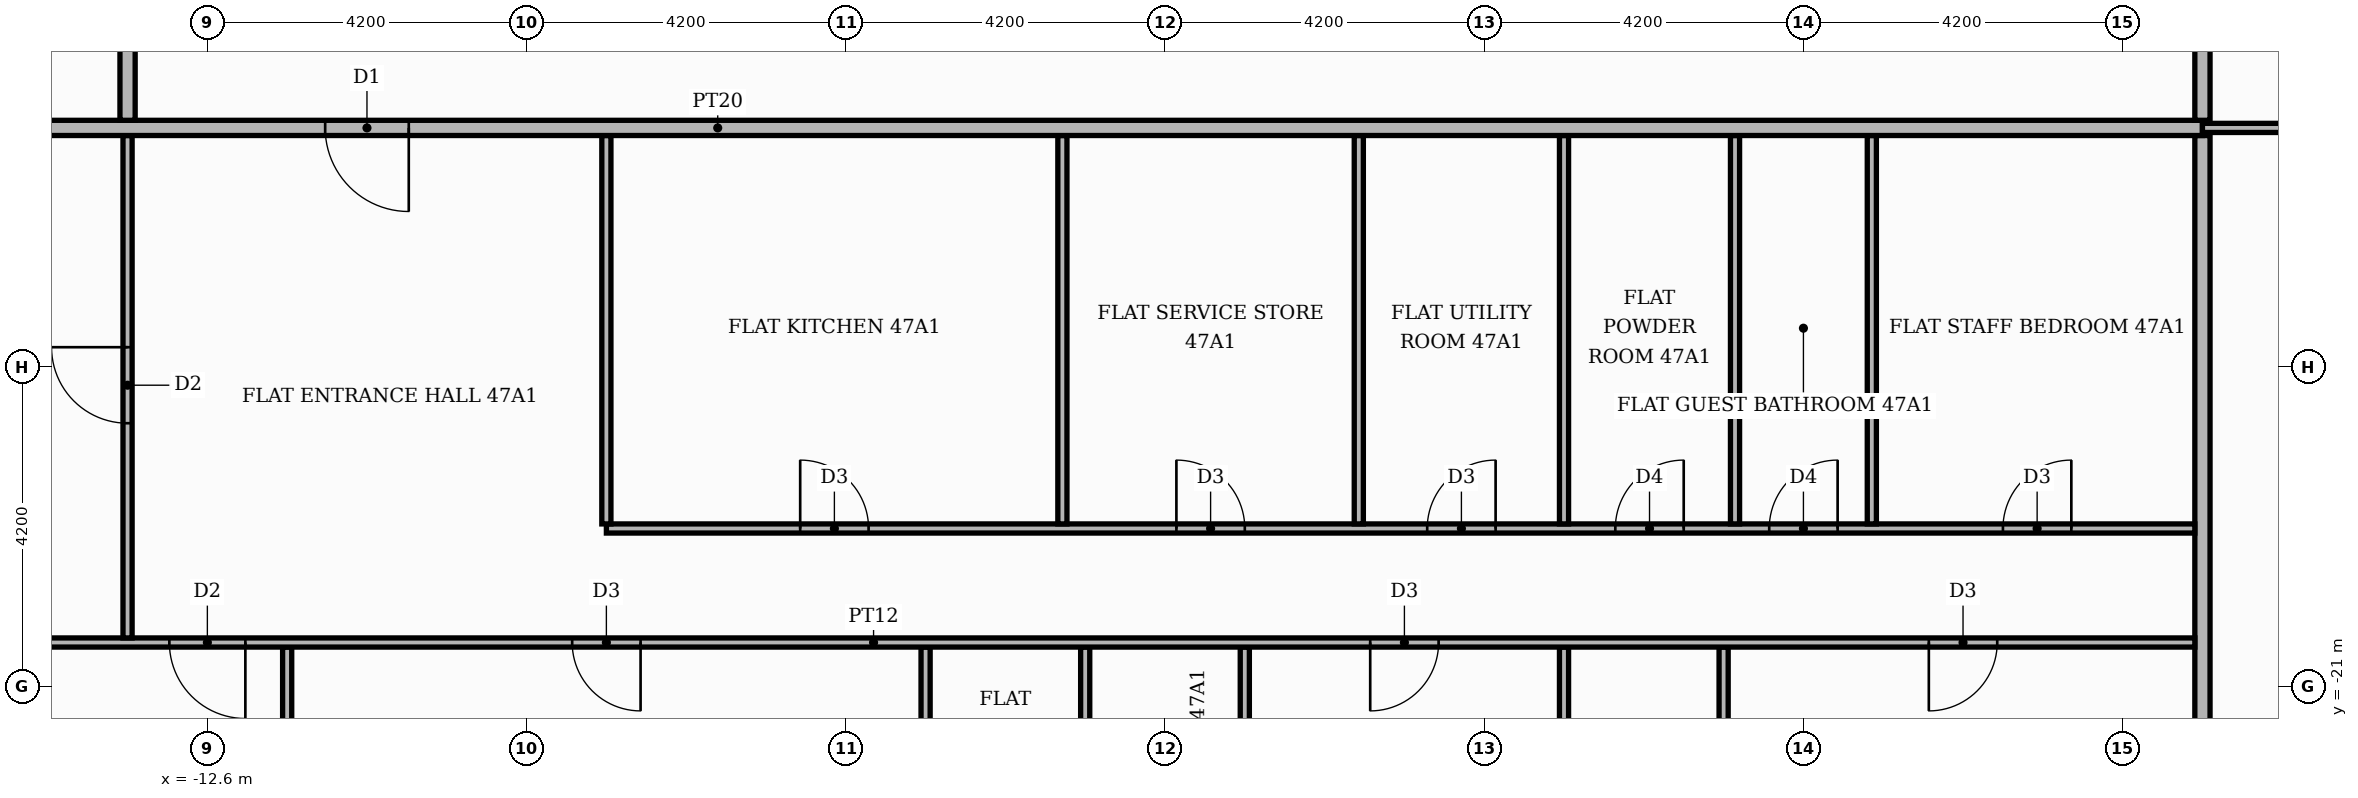
"""IFC4 building model, lengths in metres.
Left out: names, types, materials, properties, quantities, classifications, styles, units other than length and angle.
Written with IfcOpenShell. Run it as: python <this file> out.ifc"""

import sys

from ifc_helpers import new_model, si_unit, direction, frame, frame_2d, origin, place, context, subcontext, project, spatial, rectangle, extrude, element, fill, save


model = new_model("IFC4")
c1 = context("Model", 3, precision=1e-05, world=origin(), true_north=direction((0.0, 1.0)))
c2 = subcontext(c1, "Body", "Model", "MODEL_VIEW")
j1 = project(units=[si_unit("LENGTHUNIT", "METRE"), si_unit("PLANEANGLEUNIT", "RADIAN")], contexts=[c1])
p1 = place(None, origin())
s1 = spatial("IfcSite", under=j1, at=p1, CompositionType="ELEMENT")
p2 = place(p1, origin())
s2 = spatial("IfcBuilding", under=s1, at=p2, CompositionType="ELEMENT")
p3 = place(p2, frame((0.0, 0.0, 200.1)))
s3 = spatial("IfcBuildingStorey", under=s2, at=p3, CompositionType="ELEMENT", Elevation=200.1)
p4 = place(p3, frame((-11.55, -25.42, 0.0), z_axis=(0.0, 0.0, 1.0), x_axis=(0.0, 1.0, 0.0)))
e1 = element("IfcWall", 1, at=p4, inside=s3, PredefinedType="PARTITIONING", context=c2, shape_type="SweptSolid", body=[
    extrude(rectangle(XDim=4.94, YDim=0.12, at=frame_2d((2.47, 0.0))), origin(), (0.0, 0.0, 1.0), 3.48),
])
p5 = place(p3, frame((-3.15, -25.42, 0.0), z_axis=(0.0, 0.0, 1.0), x_axis=(0.0, 1.0, 0.0)))
e2 = element("IfcWall", 2, at=p5, inside=s3, PredefinedType="PARTITIONING", context=c2, shape_type="SweptSolid", body=[
    extrude(rectangle(XDim=4.94, YDim=0.12, at=frame_2d((2.47, 0.0))), origin(), (0.0, 0.0, 1.0), 3.48),
])
p6 = place(p5, frame((1.9, 0.0, 0.0)))
e3 = element("IfcOpeningElement", 3, at=p6, cuts=e2, PredefinedType="OPENING", context=c2, shape_type="SweptSolid", body=[
    extrude(rectangle(XDim=0.9, YDim=2.1, at=frame_2d((0.45, 1.05))), frame((0.0, 0.07, 0.0), z_axis=(0.0, -1.0, 0.0), x_axis=(1.0, 0.0, 0.0)), (0.0, 0.0, 1.0), 0.14),
])
p7 = place(p3, frame((-1.05, -25.42, 0.0), z_axis=(0.0, 0.0, 1.0), x_axis=(0.0, 1.0, 0.0)))
e4 = element("IfcWall", 4, at=p7, inside=s3, PredefinedType="PARTITIONING", context=c2, shape_type="SweptSolid", body=[
    extrude(rectangle(XDim=4.94, YDim=0.12, at=frame_2d((2.47, 0.0))), origin(), (0.0, 0.0, 1.0), 3.48),
])
p8 = place(p7, frame((1.9, 0.0, 0.0)))
e5 = element("IfcOpeningElement", 5, at=p8, cuts=e4, PredefinedType="OPENING", context=c2, shape_type="SweptSolid", body=[
    extrude(rectangle(XDim=0.9, YDim=2.1, at=frame_2d((0.45, 1.05))), frame((0.0, 0.07, 0.0), z_axis=(0.0, -1.0, 0.0), x_axis=(1.0, 0.0, 0.0)), (0.0, 0.0, 1.0), 0.14),
])
p9 = place(p3, frame((1.05, -25.42, 0.0), z_axis=(0.0, 0.0, 1.0), x_axis=(0.0, 1.0, 0.0)))
e6 = element("IfcWall", 6, at=p9, inside=s3, PredefinedType="PARTITIONING", context=c2, shape_type="SweptSolid", body=[
    extrude(rectangle(XDim=4.94, YDim=0.12, at=frame_2d((2.47, 0.0))), origin(), (0.0, 0.0, 1.0), 3.48),
])
p10 = place(p3, frame((5.25, -25.42, 0.0), z_axis=(0.0, 0.0, 1.0), x_axis=(0.0, 1.0, 0.0)))
e7 = element("IfcWall", 7, at=p10, inside=s3, PredefinedType="PARTITIONING", context=c2, shape_type="SweptSolid", body=[
    extrude(rectangle(XDim=4.94, YDim=0.12, at=frame_2d((2.47, 0.0))), origin(), (0.0, 0.0, 1.0), 3.48),
])
p11 = place(p10, frame((1.9, 0.0, 0.0)))
e8 = element("IfcOpeningElement", 8, at=p11, cuts=e7, PredefinedType="OPENING", context=c2, shape_type="SweptSolid", body=[
    extrude(rectangle(XDim=0.9, YDim=2.1, at=frame_2d((0.45, 1.05))), frame((0.0, 0.07, 0.0), z_axis=(0.0, -1.0, 0.0), x_axis=(1.0, 0.0, 0.0)), (0.0, 0.0, 1.0), 0.14),
])
p12 = place(p3, frame((7.35, -25.42, 0.0), z_axis=(0.0, 0.0, 1.0), x_axis=(0.0, 1.0, 0.0)))
e9 = element("IfcWall", 9, at=p12, inside=s3, PredefinedType="PARTITIONING", context=c2, shape_type="SweptSolid", body=[
    extrude(rectangle(XDim=4.94, YDim=0.12, at=frame_2d((2.47, 0.0))), origin(), (0.0, 0.0, 1.0), 3.48),
])
p13 = place(p3, frame((13.65, -25.42, 0.0), z_axis=(0.0, 0.0, 1.0), x_axis=(0.0, 1.0, 0.0)))
e10 = element("IfcWall", 10, at=p13, inside=s3, PredefinedType="PARTITIONING", context=c2, shape_type="SweptSolid", body=[
    extrude(rectangle(XDim=11.67, YDim=0.2, at=frame_2d((5.835, 0.0))), origin(), (0.0, 0.0, 1.0), 3.48),
])
p14 = place(p3, frame((-21.219, -20.42, 0.0), z_axis=(0.0, 0.0, 1.0), x_axis=(1.0, 0.0, 0.0)))
e11 = element("IfcWall", 11, at=p14, inside=s3, PredefinedType="PARTITIONING", context=c2, shape_type="SweptSolid", body=[
    extrude(rectangle(XDim=34.769, YDim=0.12, at=frame_2d((17.385, 0.0))), origin(), (0.0, 0.0, 1.0), 3.48),
])
p15 = place(p14, frame((8.119, 0.0, 0.0)))
e12 = element("IfcOpeningElement", 12, at=p15, cuts=e11, PredefinedType="OPENING", context=c2, shape_type="SweptSolid", body=[
    extrude(rectangle(XDim=1.0, YDim=2.1, at=frame_2d((0.5, 1.05))), frame((0.0, 0.07, 0.0), z_axis=(0.0, -1.0, 0.0), x_axis=(1.0, 0.0, 0.0)), (0.0, 0.0, 1.0), 0.14),
])
p16 = place(p14, frame((13.419, 0.0, 0.0)))
e13 = element("IfcOpeningElement", 13, at=p16, cuts=e11, PredefinedType="OPENING", context=c2, shape_type="SweptSolid", body=[
    extrude(rectangle(XDim=0.9, YDim=2.1, at=frame_2d((0.45, 1.05))), frame((0.0, 0.07, 0.0), z_axis=(0.0, -1.0, 0.0), x_axis=(1.0, 0.0, 0.0)), (0.0, 0.0, 1.0), 0.14),
])
p17 = place(p14, frame((23.919, 0.0, 0.0)))
e14 = element("IfcOpeningElement", 14, at=p17, cuts=e11, PredefinedType="OPENING", context=c2, shape_type="SweptSolid", body=[
    extrude(rectangle(XDim=0.9, YDim=2.1, at=frame_2d((0.45, 1.05))), frame((0.0, 0.07, 0.0), z_axis=(0.0, -1.0, 0.0), x_axis=(1.0, 0.0, 0.0)), (0.0, 0.0, 1.0), 0.14),
])
p18 = place(p14, frame((31.269, 0.0, 0.0)))
e15 = element("IfcOpeningElement", 15, at=p18, cuts=e11, PredefinedType="OPENING", context=c2, shape_type="SweptSolid", body=[
    extrude(rectangle(XDim=0.9, YDim=2.1, at=frame_2d((0.45, 1.05))), frame((0.0, 0.07, 0.0), z_axis=(0.0, -1.0, 0.0), x_axis=(1.0, 0.0, 0.0)), (0.0, 0.0, 1.0), 0.14),
])
p19 = place(p3, frame((-13.65, -20.36, 0.0), z_axis=(0.0, 0.0, 1.0), x_axis=(0.0, 1.0, 0.0)))
e16 = element("IfcWall", 16, at=p19, inside=s3, PredefinedType="PARTITIONING", context=c2, shape_type="SweptSolid", body=[
    extrude(rectangle(XDim=6.61, YDim=0.12, at=frame_2d((3.305, 0.0))), origin(), (0.0, 0.0, 1.0), 3.48),
])
p20 = place(p19, frame((2.825, 0.0, 0.0)))
e17 = element("IfcOpeningElement", 17, at=p20, cuts=e16, PredefinedType="OPENING", context=c2, shape_type="SweptSolid", body=[
    extrude(rectangle(XDim=1.0, YDim=2.1, at=frame_2d((0.5, 1.05))), frame((0.0, 0.07, 0.0), z_axis=(0.0, -1.0, 0.0), x_axis=(1.0, 0.0, 0.0)), (0.0, 0.0, 1.0), 0.14),
])
p21 = place(p3, frame((-7.35, -18.92, 0.0), z_axis=(0.0, 0.0, 1.0), x_axis=(1.0, 0.0, 0.0)))
e18 = element("IfcWall", 18, at=p21, inside=s3, PredefinedType="PARTITIONING", context=c2, shape_type="SweptSolid", body=[
    extrude(rectangle(XDim=20.9, YDim=0.12, at=frame_2d((10.45, 0.0))), origin(), (0.0, 0.0, 1.0), 3.48),
])
p22 = place(p21, frame((2.55, 0.0, 0.0)))
e19 = element("IfcOpeningElement", 19, at=p22, cuts=e18, PredefinedType="OPENING", context=c2, shape_type="SweptSolid", body=[
    extrude(rectangle(XDim=0.9, YDim=2.1, at=frame_2d((0.45, 1.05))), frame((0.0, 0.07, 0.0), z_axis=(0.0, -1.0, 0.0), x_axis=(1.0, 0.0, 0.0)), (0.0, 0.0, 1.0), 0.14),
])
p23 = place(p21, frame((7.5, 0.0, 0.0)))
e20 = element("IfcOpeningElement", 20, at=p23, cuts=e18, PredefinedType="OPENING", context=c2, shape_type="SweptSolid", body=[
    extrude(rectangle(XDim=0.9, YDim=2.1, at=frame_2d((0.45, 1.05))), frame((0.0, 0.07, 0.0), z_axis=(0.0, -1.0, 0.0), x_axis=(1.0, 0.0, 0.0)), (0.0, 0.0, 1.0), 0.14),
])
p24 = place(p21, frame((10.8, 0.0, 0.0)))
e21 = element("IfcOpeningElement", 21, at=p24, cuts=e18, PredefinedType="OPENING", context=c2, shape_type="SweptSolid", body=[
    extrude(rectangle(XDim=0.9, YDim=2.1, at=frame_2d((0.45, 1.05))), frame((0.0, 0.07, 0.0), z_axis=(0.0, -1.0, 0.0), x_axis=(1.0, 0.0, 0.0)), (0.0, 0.0, 1.0), 0.14),
])
p25 = place(p21, frame((13.275, 0.0, 0.0)))
e22 = element("IfcOpeningElement", 22, at=p25, cuts=e18, PredefinedType="OPENING", context=c2, shape_type="SweptSolid", body=[
    extrude(rectangle(XDim=0.9, YDim=2.1, at=frame_2d((0.45, 1.05))), frame((0.0, 0.07, 0.0), z_axis=(0.0, -1.0, 0.0), x_axis=(1.0, 0.0, 0.0)), (0.0, 0.0, 1.0), 0.14),
])
p26 = place(p21, frame((15.3, 0.0, 0.0)))
e23 = element("IfcOpeningElement", 23, at=p26, cuts=e18, PredefinedType="OPENING", context=c2, shape_type="SweptSolid", body=[
    extrude(rectangle(XDim=0.9, YDim=2.1, at=frame_2d((0.45, 1.05))), frame((0.0, 0.07, 0.0), z_axis=(0.0, -1.0, 0.0), x_axis=(1.0, 0.0, 0.0)), (0.0, 0.0, 1.0), 0.14),
])
p27 = place(p21, frame((18.375, 0.0, 0.0)))
e24 = element("IfcOpeningElement", 24, at=p27, cuts=e18, PredefinedType="OPENING", context=c2, shape_type="SweptSolid", body=[
    extrude(rectangle(XDim=0.9, YDim=2.1, at=frame_2d((0.45, 1.05))), frame((0.0, 0.07, 0.0), z_axis=(0.0, -1.0, 0.0), x_axis=(1.0, 0.0, 0.0)), (0.0, 0.0, 1.0), 0.14),
])
for number, where, z_axis, x_axis in (
    (25, (-7.35, -18.86, 0.0), (0.0, 0.0, 1.0), (0.0, 1.0, 0.0)),
    (26, (-1.35, -18.86, 0.0), (0.0, 0.0, 1.0), (0.0, 1.0, 0.0)),
    (27, (2.55, -18.86, 0.0), (0.0, 0.0, 1.0), (0.0, 1.0, 0.0)),
    (28, (5.25, -18.86, 0.0), (0.0, 0.0, 1.0), (0.0, 1.0, 0.0)),
    (29, (7.5, -18.86, 0.0), (0.0, 0.0, 1.0), (0.0, 1.0, 0.0)),
    (30, (9.3, -18.86, 0.0), (0.0, 0.0, 1.0), (0.0, 1.0, 0.0)),
):
    element("IfcWall", number, at=place(p3, frame(where, z_axis=z_axis, x_axis=x_axis)), inside=s3, PredefinedType="PARTITIONING", context=c2, shape_type="SweptSolid", body=[
        extrude(rectangle(XDim=5.11, YDim=0.12, at=frame_2d((2.555, 0.0))), origin(), (0.0, 0.0, 1.0), 3.48),
    ])
p28 = place(p3, frame((-25.42, -13.65, 0.0), z_axis=(0.0, 0.0, 1.0), x_axis=(1.0, 0.0, 0.0)))
e31 = element("IfcWall", 31, at=p28, inside=s3, PredefinedType="PARTITIONING", context=c2, shape_type="SweptSolid", body=[
    extrude(rectangle(XDim=39.07, YDim=0.2, at=frame_2d((19.535, 0.0))), origin(), (0.0, 0.0, 1.0), 3.48),
])
p29 = place(p28, frame((14.37, 0.0, 0.0)))
e32 = element("IfcOpeningElement", 32, at=p29, cuts=e31, PredefinedType="OPENING", context=c2, shape_type="SweptSolid", body=[
    extrude(rectangle(XDim=1.1, YDim=2.4, at=frame_2d((0.55, 1.2))), frame((0.0, 0.11, 0.0), z_axis=(0.0, -1.0, 0.0), x_axis=(1.0, 0.0, 0.0)), (0.0, 0.0, 1.0), 0.22),
])
p30 = place(p3, frame((13.65, -13.65, 0.0), z_axis=(0.0, 0.0, 1.0), x_axis=(1.0, 0.0, 0.0)))
e33 = element("IfcWall", 33, at=p30, inside=s3, PredefinedType="PARTITIONING", context=c2, shape_type="SweptSolid", body=[
    extrude(rectangle(XDim=7.07, YDim=0.12, at=frame_2d((3.535, 0.0))), origin(), (0.0, 0.0, 1.0), 3.48),
])
p31 = place(p30, frame((3.085, 0.0, 0.0)))
e34 = element("IfcOpeningElement", 34, at=p31, cuts=e33, PredefinedType="OPENING", context=c2, shape_type="SweptSolid", body=[
    extrude(rectangle(XDim=0.9, YDim=2.1, at=frame_2d((0.45, 1.05))), frame((0.0, 0.07, 0.0), z_axis=(0.0, -1.0, 0.0), x_axis=(1.0, 0.0, 0.0)), (0.0, 0.0, 1.0), 0.14),
])
p32 = place(p3, frame((-13.65, -13.55, 0.0), z_axis=(0.0, 0.0, 1.0), x_axis=(0.0, 1.0, 0.0)))
e35 = element("IfcWall", 35, at=p32, inside=s3, PredefinedType="PARTITIONING", context=c2, shape_type="SweptSolid", body=[
    extrude(rectangle(XDim=27.1, YDim=0.2, at=frame_2d((13.55, 0.0))), origin(), (0.0, 0.0, 1.0), 3.48),
])
p33 = place(p32, frame((23.5, 0.0, 0.0)))
e36 = element("IfcOpeningElement", 36, at=p33, cuts=e35, PredefinedType="OPENING", context=c2, shape_type="SweptSolid", body=[
    extrude(rectangle(XDim=1.1, YDim=2.4, at=frame_2d((0.55, 1.2))), frame((0.0, 0.11, 0.0), z_axis=(0.0, -1.0, 0.0), x_axis=(1.0, 0.0, 0.0)), (0.0, 0.0, 1.0), 0.22),
])
p34 = place(p3, frame((13.65, -13.55, 0.0), z_axis=(0.0, 0.0, 1.0), x_axis=(0.0, 1.0, 0.0)))
e37 = element("IfcWall", 37, at=p34, inside=s3, PredefinedType="PARTITIONING", context=c2, shape_type="SweptSolid", body=[
    extrude(rectangle(XDim=2.45, YDim=0.2, at=frame_2d((1.225, 0.0))), origin(), (0.0, 0.0, 1.0), 3.48),
])
p35 = place(p29, frame((1.1, 0.0, 0.0), z_axis=(0.0, 0.0, 1.0), x_axis=(-1.0, 0.0, 0.0)))
e38 = element("IfcDoor", 38, at=p35, inside=s3, OperationType="SINGLE_SWING_RIGHT", PredefinedType="DOOR", context=c2, shape_type="SweptSolid", body=[
    extrude(rectangle(XDim=1.1, YDim=2.4, at=frame_2d((0.55, 1.2))), frame((0.0, 0.025, 0.0), z_axis=(0.0, -1.0, 0.0), x_axis=(1.0, 0.0, 0.0)), (0.0, 0.0, 1.0), 0.05),
])
fill(e32, e38)
p36 = place(p20, origin())
e39 = element("IfcDoor", 39, at=p36, inside=s3, OperationType="SINGLE_SWING_RIGHT", PredefinedType="DOOR", context=c2, shape_type="SweptSolid", body=[
    extrude(rectangle(XDim=1.0, YDim=2.1, at=frame_2d((0.5, 1.05))), frame((0.0, 0.025, 0.0), z_axis=(0.0, -1.0, 0.0), x_axis=(1.0, 0.0, 0.0)), (0.0, 0.0, 1.0), 0.05),
])
fill(e17, e39)
p37 = place(p22, origin())
e40 = element("IfcDoor", 40, at=p37, inside=s3, OperationType="SINGLE_SWING_LEFT", PredefinedType="DOOR", context=c2, shape_type="SweptSolid", body=[
    extrude(rectangle(XDim=0.9, YDim=2.1, at=frame_2d((0.45, 1.05))), frame((0.0, 0.025, 0.0), z_axis=(0.0, -1.0, 0.0), x_axis=(1.0, 0.0, 0.0)), (0.0, 0.0, 1.0), 0.05),
])
fill(e19, e40)
p38 = place(p23, origin())
e41 = element("IfcDoor", 41, at=p38, inside=s3, OperationType="SINGLE_SWING_LEFT", PredefinedType="DOOR", context=c2, shape_type="SweptSolid", body=[
    extrude(rectangle(XDim=0.9, YDim=2.1, at=frame_2d((0.45, 1.05))), frame((0.0, 0.025, 0.0), z_axis=(0.0, -1.0, 0.0), x_axis=(1.0, 0.0, 0.0)), (0.0, 0.0, 1.0), 0.05),
])
fill(e20, e41)
p39 = place(p24, origin())
e42 = element("IfcDoor", 42, at=p39, inside=s3, OperationType="SINGLE_SWING_RIGHT", PredefinedType="DOOR", context=c2, shape_type="SweptSolid", body=[
    extrude(rectangle(XDim=0.9, YDim=2.1, at=frame_2d((0.45, 1.05))), frame((0.0, 0.025, 0.0), z_axis=(0.0, -1.0, 0.0), x_axis=(1.0, 0.0, 0.0)), (0.0, 0.0, 1.0), 0.05),
])
fill(e21, e42)
p40 = place(p25, origin())
e43 = element("IfcDoor", 43, at=p40, inside=s3, OperationType="SINGLE_SWING_RIGHT", PredefinedType="DOOR", context=c2, shape_type="SweptSolid", body=[
    extrude(rectangle(XDim=0.9, YDim=2.1, at=frame_2d((0.45, 1.05))), frame((0.0, 0.025, 0.0), z_axis=(0.0, -1.0, 0.0), x_axis=(1.0, 0.0, 0.0)), (0.0, 0.0, 1.0), 0.05),
])
fill(e22, e43)
p41 = place(p26, origin())
e44 = element("IfcDoor", 44, at=p41, inside=s3, OperationType="SINGLE_SWING_RIGHT", PredefinedType="DOOR", context=c2, shape_type="SweptSolid", body=[
    extrude(rectangle(XDim=0.9, YDim=2.1, at=frame_2d((0.45, 1.05))), frame((0.0, 0.025, 0.0), z_axis=(0.0, -1.0, 0.0), x_axis=(1.0, 0.0, 0.0)), (0.0, 0.0, 1.0), 0.05),
])
fill(e23, e44)
p42 = place(p27, origin())
e45 = element("IfcDoor", 45, at=p42, inside=s3, OperationType="SINGLE_SWING_RIGHT", PredefinedType="DOOR", context=c2, shape_type="SweptSolid", body=[
    extrude(rectangle(XDim=0.9, YDim=2.1, at=frame_2d((0.45, 1.05))), frame((0.0, 0.025, 0.0), z_axis=(0.0, -1.0, 0.0), x_axis=(1.0, 0.0, 0.0)), (0.0, 0.0, 1.0), 0.05),
])
fill(e24, e45)
p43 = place(p15, frame((1.0, 0.0, 0.0), z_axis=(0.0, 0.0, 1.0), x_axis=(-1.0, 0.0, 0.0)))
e46 = element("IfcDoor", 46, at=p43, inside=s3, OperationType="SINGLE_SWING_RIGHT", PredefinedType="DOOR", context=c2, shape_type="SweptSolid", body=[
    extrude(rectangle(XDim=1.0, YDim=2.1, at=frame_2d((0.5, 1.05))), frame((0.0, 0.025, 0.0), z_axis=(0.0, -1.0, 0.0), x_axis=(1.0, 0.0, 0.0)), (0.0, 0.0, 1.0), 0.05),
])
fill(e12, e46)
p44 = place(p16, frame((0.9, 0.0, 0.0), z_axis=(0.0, 0.0, 1.0), x_axis=(-1.0, 0.0, 0.0)))
e47 = element("IfcDoor", 47, at=p44, inside=s3, OperationType="SINGLE_SWING_RIGHT", PredefinedType="DOOR", context=c2, shape_type="SweptSolid", body=[
    extrude(rectangle(XDim=0.9, YDim=2.1, at=frame_2d((0.45, 1.05))), frame((0.0, 0.025, 0.0), z_axis=(0.0, -1.0, 0.0), x_axis=(1.0, 0.0, 0.0)), (0.0, 0.0, 1.0), 0.05),
])
fill(e13, e47)
p45 = place(p17, frame((0.9, 0.0, 0.0), z_axis=(0.0, 0.0, 1.0), x_axis=(-1.0, 0.0, 0.0)))
e48 = element("IfcDoor", 48, at=p45, inside=s3, OperationType="SINGLE_SWING_LEFT", PredefinedType="DOOR", context=c2, shape_type="SweptSolid", body=[
    extrude(rectangle(XDim=0.9, YDim=2.1, at=frame_2d((0.45, 1.05))), frame((0.0, 0.025, 0.0), z_axis=(0.0, -1.0, 0.0), x_axis=(1.0, 0.0, 0.0)), (0.0, 0.0, 1.0), 0.05),
])
fill(e14, e48)
p46 = place(p18, frame((0.9, 0.0, 0.0), z_axis=(0.0, 0.0, 1.0), x_axis=(-1.0, 0.0, 0.0)))
e49 = element("IfcDoor", 49, at=p46, inside=s3, OperationType="SINGLE_SWING_LEFT", PredefinedType="DOOR", context=c2, shape_type="SweptSolid", body=[
    extrude(rectangle(XDim=0.9, YDim=2.1, at=frame_2d((0.45, 1.05))), frame((0.0, 0.025, 0.0), z_axis=(0.0, -1.0, 0.0), x_axis=(1.0, 0.0, 0.0)), (0.0, 0.0, 1.0), 0.05),
])
fill(e15, e49)
save(model, sys.argv[1])
